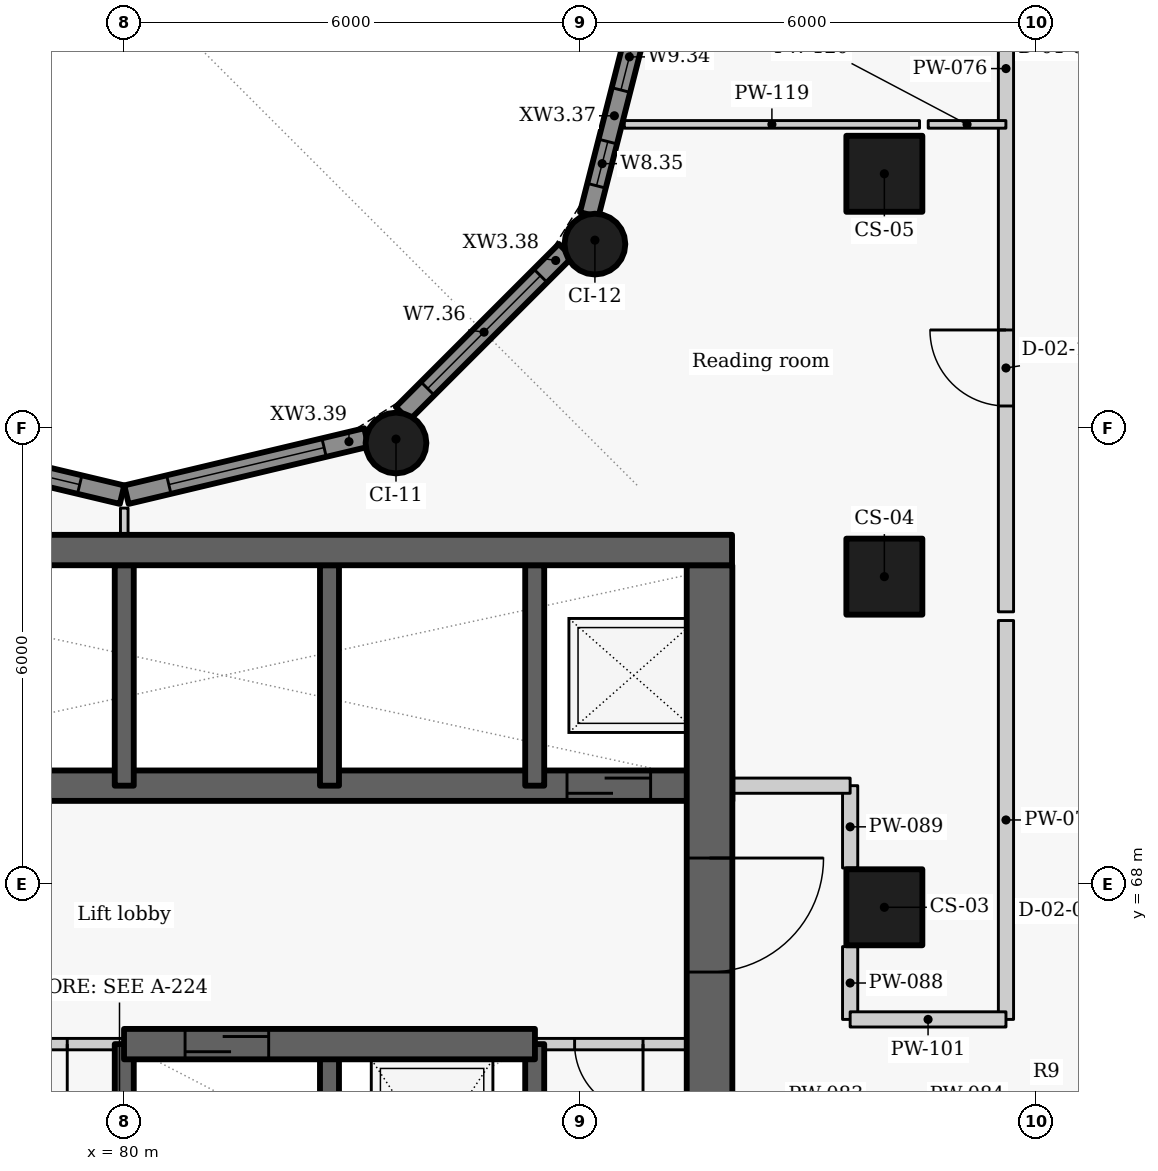
"""IFC4 building model, lengths in metres.
Left out: names, types, materials, properties, quantities, classifications, styles, units other than length and angle.
Written with IfcOpenShell. Run it as: python <this file> out.ifc"""

import sys

from ifc_helpers import new_model, si_unit, direction, frame, frame_2d, origin, origin_2d, place, context, subcontext, project, spatial, rectangle, circle, extrude, element, fill, save


model = new_model("IFC4")
c1 = context("Model", 3, precision=1e-05, world=origin(), true_north=direction((0.0, 1.0)))
c2 = subcontext(c1, "Body", "Model", "MODEL_VIEW")
j1 = project(units=[si_unit("LENGTHUNIT", "METRE"), si_unit("PLANEANGLEUNIT", "RADIAN")], contexts=[c1])
p1 = place(None, origin())
s1 = spatial("IfcSite", under=j1, at=p1, CompositionType="ELEMENT")
p2 = place(p1, origin())
s2 = spatial("IfcBuilding", under=s1, at=p2, CompositionType="ELEMENT")
p3 = place(p2, frame((0.0, 0.0, 127.2)))
s3 = spatial("IfcBuildingStorey", under=s2, at=p3, CompositionType="ELEMENT", Elevation=127.2)
for number, where, z_axis, x_axis in (
    (1, (90.0, 67.7, 0.0), (0.0, 0.0, 1.0), (0.0, 1.0, 0.0)),
    (2, (90.0, 72.05, 0.0), (0.0, 0.0, 1.0), (0.0, 1.0, 0.0)),
    (3, (90.0, 77.35, 0.0), (0.0, 0.0, 1.0), (0.0, 1.0, 0.0)),
):
    element("IfcColumn", number, at=place(p3, frame(where, z_axis=z_axis, x_axis=x_axis)), inside=s3, PredefinedType="COLUMN", context=c2, shape_type="SweptSolid", body=[
        extrude(rectangle(XDim=1.0, YDim=1.0, at=origin_2d()), origin(), (0.0, 0.0, 1.0), 3.3),
    ])
for number, where, z_axis, x_axis in (
    (4, (83.575, 73.808, 0.0), (0.0, 0.0, 1.0), (0.866, 0.5, 0.0)),
    (5, (86.192, 76.425, 0.0), (0.0, 0.0, 1.0), (0.5, 0.866, 0.0)),
):
    element("IfcColumn", number, at=place(p3, frame(where, z_axis=z_axis, x_axis=x_axis)), inside=s3, PredefinedType="COLUMN", context=c2, shape_type="SweptSolid", body=[
        extrude(circle(Radius=0.4, at=origin_2d()), origin(), (0.0, 0.0, 1.0), 3.3),
    ])
p4 = place(p3, frame((86.86, 79.73, 0.0), z_axis=(0.0, 0.0, 1.0), x_axis=(-0.247055971283, -0.969001211069, 0.0)))
e6 = element("IfcWall", 6, at=p4, inside=s3, PredefinedType="SOLIDWALL", context=c2, shape_type="SweptSolid", body=[
    extrude(rectangle(XDim=3.01, YDim=0.25, at=frame_2d((1.505, 0.0))), origin(), (0.0, 0.0, 1.0), 2.425),
])
p5 = place(p4, frame((0.419, 0.0, 0.9)))
e7 = element("IfcOpeningElement", 7, at=p5, cuts=e6, PredefinedType="OPENING", context=c2, shape_type="SweptSolid", body=[
    extrude(rectangle(XDim=0.9, YDim=1.1, at=frame_2d((0.45, 0.55))), frame((0.0, 0.135, 0.0), z_axis=(0.0, -1.0, 0.0), x_axis=(1.0, 0.0, 0.0)), (0.0, 0.0, 1.0), 0.27),
])
p6 = place(p4, frame((2.018, 0.0, 0.9)))
e8 = element("IfcOpeningElement", 8, at=p6, cuts=e6, PredefinedType="OPENING", context=c2, shape_type="SweptSolid", body=[
    extrude(rectangle(XDim=0.6, YDim=1.1, at=frame_2d((0.3, 0.55))), frame((0.0, 0.135, 0.0), z_axis=(0.0, -1.0, 0.0), x_axis=(1.0, 0.0, 0.0)), (0.0, 0.0, 1.0), 0.27),
])
p7 = place(p3, frame((85.806, 76.339, 0.0), z_axis=(0.0, 0.0, 1.0), x_axis=(-0.707106781187, -0.707106781187, 0.0)))
e9 = element("IfcWall", 9, at=p7, inside=s3, PredefinedType="SOLIDWALL", context=c2, shape_type="SweptSolid", body=[
    extrude(rectangle(XDim=3.033, YDim=0.25, at=frame_2d((1.517, 0.0))), origin(), (0.0, 0.0, 1.0), 2.425),
])
p8 = place(p7, frame((0.467, 0.0, 0.9)))
e10 = element("IfcOpeningElement", 10, at=p8, cuts=e9, PredefinedType="OPENING", context=c2, shape_type="SweptSolid", body=[
    extrude(rectangle(XDim=2.1, YDim=1.1, at=frame_2d((1.05, 0.55))), frame((0.0, 0.135, 0.0), z_axis=(0.0, -1.0, 0.0), x_axis=(1.0, 0.0, 0.0)), (0.0, 0.0, 1.0), 0.27),
])
p9 = place(p3, frame((83.186, 73.881, 0.0), z_axis=(0.0, 0.0, 1.0), x_axis=(-0.972773113459, -0.231759508395, 0.0)))
e11 = element("IfcWall", 11, at=p9, inside=s3, PredefinedType="SOLIDWALL", context=c2, shape_type="SweptSolid", body=[
    extrude(rectangle(XDim=3.246, YDim=0.25, at=frame_2d((1.623, 0.0))), origin(), (0.0, 0.0, 1.0), 2.425),
])
p10 = place(p9, frame((0.573, 0.0, 0.9)))
e12 = element("IfcOpeningElement", 12, at=p10, cuts=e11, PredefinedType="OPENING", context=c2, shape_type="SweptSolid", body=[
    extrude(rectangle(XDim=2.1, YDim=1.1, at=frame_2d((1.05, 0.55))), frame((0.0, 0.135, 0.0), z_axis=(0.0, -1.0, 0.0), x_axis=(1.0, 0.0, 0.0)), (0.0, 0.0, 1.0), 0.27),
])
p11 = place(p3, frame((79.971, 73.128, 0.0), z_axis=(0.0, 0.0, 1.0), x_axis=(-0.972773113459, 0.231759508395, 0.0)))
e13 = element("IfcWall", 13, at=p11, inside=s3, PredefinedType="SOLIDWALL", context=c2, shape_type="SweptSolid", body=[
    extrude(rectangle(XDim=3.246, YDim=0.25, at=frame_2d((1.623, 0.0))), origin(), (0.0, 0.0, 1.0), 2.425),
])
p12 = place(p11, frame((0.573, 0.0, 0.9)))
e14 = element("IfcOpeningElement", 14, at=p12, cuts=e13, PredefinedType="OPENING", context=c2, shape_type="SweptSolid", body=[
    extrude(rectangle(XDim=2.1, YDim=1.1, at=frame_2d((1.05, 0.55))), frame((0.0, 0.135, 0.0), z_axis=(0.0, -1.0, 0.0), x_axis=(1.0, 0.0, 0.0)), (0.0, 0.0, 1.0), 0.27),
])
p13 = place(p3, frame((74.6, 69.3, -0.41), z_axis=(0.0, 0.0, 1.0), x_axis=(1.0, 0.0, 0.0)))
e15 = element("IfcWall", 15, at=p13, inside=s3, PredefinedType="SHEAR", context=c2, shape_type="SweptSolid", body=[
    extrude(rectangle(XDim=13.4, YDim=0.4, at=frame_2d((6.7, 0.0))), origin(), (0.0, 0.0, 1.0), 3.435),
])
p14 = place(p13, frame((11.225, 0.0, 0.41)))
e16 = element("IfcOpeningElement", 16, at=p14, cuts=e15, PredefinedType="OPENING", context=c2, shape_type="SweptSolid", body=[
    extrude(rectangle(XDim=1.1, YDim=2.1, at=frame_2d((0.55, 1.05))), frame((0.0, 0.21, 0.0), z_axis=(0.0, -1.0, 0.0), x_axis=(1.0, 0.0, 0.0)), (0.0, 0.0, 1.0), 0.42),
])
p15 = place(p3, frame((80.0, 63.1, -0.41), z_axis=(0.0, 0.0, 1.0), x_axis=(0.0, 1.0, 0.0)))
e17 = element("IfcWall", 17, at=p15, inside=s3, PredefinedType="SHEAR", context=c2, shape_type="SweptSolid", body=[
    extrude(rectangle(XDim=2.8, YDim=0.25, at=frame_2d((1.4, 0.0))), origin(), (0.0, 0.0, 1.0), 3.435),
])
p16 = place(p3, frame((80.0, 69.3, -0.41), z_axis=(0.0, 0.0, 1.0), x_axis=(0.0, 1.0, 0.0)))
e18 = element("IfcWall", 18, at=p16, inside=s3, PredefinedType="SHEAR", context=c2, shape_type="SweptSolid", body=[
    extrude(rectangle(XDim=2.9, YDim=0.25, at=frame_2d((1.45, 0.0))), origin(), (0.0, 0.0, 1.0), 3.435),
])
p17 = place(p3, frame((82.7, 63.1, -0.41), z_axis=(0.0, 0.0, 1.0), x_axis=(0.0, 1.0, 0.0)))
e19 = element("IfcWall", 19, at=p17, inside=s3, PredefinedType="SHEAR", context=c2, shape_type="SweptSolid", body=[
    extrude(rectangle(XDim=2.8, YDim=0.25, at=frame_2d((1.4, 0.0))), origin(), (0.0, 0.0, 1.0), 3.435),
])
p18 = place(p3, frame((82.7, 69.3, -0.41), z_axis=(0.0, 0.0, 1.0), x_axis=(0.0, 1.0, 0.0)))
e20 = element("IfcWall", 20, at=p18, inside=s3, PredefinedType="SHEAR", context=c2, shape_type="SweptSolid", body=[
    extrude(rectangle(XDim=2.9, YDim=0.25, at=frame_2d((1.45, 0.0))), origin(), (0.0, 0.0, 1.0), 3.435),
])
p19 = place(p3, frame((85.4, 63.1, -0.41), z_axis=(0.0, 0.0, 1.0), x_axis=(0.0, 1.0, 0.0)))
e21 = element("IfcWall", 21, at=p19, inside=s3, PredefinedType="SHEAR", context=c2, shape_type="SweptSolid", body=[
    extrude(rectangle(XDim=2.8, YDim=0.25, at=frame_2d((1.4, 0.0))), origin(), (0.0, 0.0, 1.0), 3.435),
])
p20 = place(p3, frame((85.4, 69.3, -0.41), z_axis=(0.0, 0.0, 1.0), x_axis=(0.0, 1.0, 0.0)))
e22 = element("IfcWall", 22, at=p20, inside=s3, PredefinedType="SHEAR", context=c2, shape_type="SweptSolid", body=[
    extrude(rectangle(XDim=2.9, YDim=0.25, at=frame_2d((1.45, 0.0))), origin(), (0.0, 0.0, 1.0), 3.435),
])
p21 = place(p3, frame((87.7, 72.2, -0.41), z_axis=(0.0, 0.0, 1.0), x_axis=(0.0, -1.0, 0.0)))
e23 = element("IfcWall", 23, at=p21, inside=s3, PredefinedType="SHEAR", context=c2, shape_type="SweptSolid", body=[
    extrude(rectangle(XDim=15.6, YDim=0.6, at=frame_2d((7.8, 0.0))), origin(), (0.0, 0.0, 1.0), 3.435),
])
p22 = place(p21, frame((3.852, 0.0, 0.41)))
e24 = element("IfcOpeningElement", 24, at=p22, cuts=e23, PredefinedType="OPENING", context=c2, shape_type="SweptSolid", body=[
    extrude(rectangle(XDim=1.5, YDim=2.1, at=frame_2d((0.75, 1.05))), frame((0.0, 0.31, 0.0), z_axis=(0.0, -1.0, 0.0), x_axis=(1.0, 0.0, 0.0)), (0.0, 0.0, 1.0), 0.62),
])
p23 = place(p3, frame((80.003, 65.9, 0.0), z_axis=(0.0, 0.0, 1.0), x_axis=(-1.0, 0.0, 0.0)))
e25 = element("IfcWall", 25, at=p23, inside=s3, PredefinedType="PARTITIONING", context=c2, shape_type="SweptSolid", body=[
    extrude(rectangle(XDim=2.706, YDim=0.15, at=frame_2d((1.353, 0.0))), origin(), (0.0, 0.0, 1.0), 3.025),
])
p24 = place(p23, frame((0.753, 0.0, 0.0)))
e26 = element("IfcOpeningElement", 26, at=p24, cuts=e25, PredefinedType="OPENING", context=c2, shape_type="SweptSolid", body=[
    extrude(rectangle(XDim=1.2, YDim=2.1, at=frame_2d((0.6, 1.05))), frame((0.0, 0.085, 0.0), z_axis=(0.0, -1.0, 0.0), x_axis=(1.0, 0.0, 0.0)), (0.0, 0.0, 1.0), 0.17),
])
p25 = place(p3, frame((88.0, 65.9, 0.0), z_axis=(0.0, 0.0, 1.0), x_axis=(-1.0, 0.0, 0.0)))
e27 = element("IfcWall", 27, at=p25, inside=s3, PredefinedType="PARTITIONING", context=c2, shape_type="SweptSolid", body=[
    extrude(rectangle(XDim=2.603, YDim=0.15, at=frame_2d((1.302, 0.0))), origin(), (0.0, 0.0, 1.0), 3.025),
])
p26 = place(p25, frame((1.175, 0.0, 0.0)))
e28 = element("IfcOpeningElement", 28, at=p26, cuts=e27, PredefinedType="OPENING", context=c2, shape_type="SweptSolid", body=[
    extrude(rectangle(XDim=0.9, YDim=2.1, at=frame_2d((0.45, 1.05))), frame((0.0, 0.085, 0.0), z_axis=(0.0, -1.0, 0.0), x_axis=(1.0, 0.0, 0.0)), (0.0, 0.0, 1.0), 0.17),
])
p27 = place(p3, frame((79.997, 65.9, -0.41), z_axis=(0.0, 0.0, 1.0), x_axis=(1.0, 0.0, 0.0)))
e29 = element("IfcWall", 29, at=p27, inside=s3, PredefinedType="SHEAR", context=c2, shape_type="SweptSolid", body=[
    extrude(rectangle(XDim=5.406, YDim=0.4, at=frame_2d((2.703, 0.0))), origin(), (0.0, 0.0, 1.0), 3.435),
])
p28 = place(p27, frame((0.803, 0.0, 0.41)))
e30 = element("IfcOpeningElement", 30, at=p28, cuts=e29, PredefinedType="OPENING", context=c2, shape_type="SweptSolid", body=[
    extrude(rectangle(XDim=1.1, YDim=2.1, at=frame_2d((0.55, 1.05))), frame((0.0, 0.21, 0.0), z_axis=(0.0, -1.0, 0.0), x_axis=(1.0, 0.0, 0.0)), (0.0, 0.0, 1.0), 0.42),
])
p29 = place(p3, frame((91.6, 66.225, 0.0), z_axis=(0.0, 0.0, 1.0), x_axis=(0.0, 1.0, 0.0)))
e31 = element("IfcWall", 31, at=p29, inside=s3, PredefinedType="PARTITIONING", context=c2, shape_type="SweptSolid", body=[
    extrude(rectangle(XDim=5.248, YDim=0.2, at=frame_2d((2.624, 0.0))), origin(), (0.0, 0.0, 1.0), 3.025),
])
p30 = place(p3, frame((91.6, 71.587, 0.0), z_axis=(0.0, 0.0, 1.0), x_axis=(0.0, 1.0, 0.0)))
e32 = element("IfcWall", 32, at=p30, inside=s3, PredefinedType="PARTITIONING", context=c2, shape_type="SweptSolid", body=[
    extrude(rectangle(XDim=10.486, YDim=0.2, at=frame_2d((5.243, 0.0))), origin(), (0.0, 0.0, 1.0), 3.025),
])
p31 = place(p30, frame((2.708, 0.0, 0.0)))
e33 = element("IfcOpeningElement", 33, at=p31, cuts=e32, PredefinedType="OPENING", context=c2, shape_type="SweptSolid", body=[
    extrude(rectangle(XDim=1.0, YDim=2.1, at=frame_2d((0.5, 1.05))), frame((0.0, 0.11, 0.0), z_axis=(0.0, -1.0, 0.0), x_axis=(1.0, 0.0, 0.0)), (0.0, 0.0, 1.0), 0.22),
])
p32 = place(p3, frame((89.55, 66.225, 0.0), z_axis=(0.0, 0.0, 1.0), x_axis=(0.0, 1.0, 0.0)))
e34 = element("IfcWall", 34, at=p32, inside=s3, PredefinedType="PARTITIONING", context=c2, shape_type="SweptSolid", body=[
    extrude(rectangle(XDim=0.958, YDim=0.2, at=frame_2d((0.479, 0.0))), origin(), (0.0, 0.0, 1.0), 3.025),
])
p33 = place(p3, frame((89.55, 68.217, 0.0), z_axis=(0.0, 0.0, 1.0), x_axis=(0.0, 1.0, 0.0)))
e35 = element("IfcWall", 35, at=p33, inside=s3, PredefinedType="PARTITIONING", context=c2, shape_type="SweptSolid", body=[
    extrude(rectangle(XDim=1.083, YDim=0.2, at=frame_2d((0.542, 0.0))), origin(), (0.0, 0.0, 1.0), 3.025),
])
p34 = place(p3, frame((88.0, 69.3, 0.0), z_axis=(0.0, 0.0, 1.0), x_axis=(1.0, 0.0, 0.0)))
e36 = element("IfcWall", 36, at=p34, inside=s3, PredefinedType="PARTITIONING", context=c2, shape_type="SweptSolid", body=[
    extrude(rectangle(XDim=1.55, YDim=0.2, at=frame_2d((0.775, 0.0))), origin(), (0.0, 0.0, 1.0), 3.025),
])
p35 = place(p3, frame((89.55, 66.225, 0.0), z_axis=(0.0, 0.0, 1.0), x_axis=(1.0, 0.0, 0.0)))
e37 = element("IfcWall", 37, at=p35, inside=s3, PredefinedType="PARTITIONING", context=c2, shape_type="SweptSolid", body=[
    extrude(rectangle(XDim=2.05, YDim=0.2, at=frame_2d((1.025, 0.0))), origin(), (0.0, 0.0, 1.0), 2.505),
])
p36 = place(p3, frame((80.0, 72.6, 0.0), z_axis=(0.0, 0.0, 1.0), x_axis=(0.0, 1.0, 0.0)))
e38 = element("IfcWall", 38, at=p36, inside=s3, PredefinedType="PARTITIONING", context=c2, shape_type="SweptSolid", body=[
    extrude(rectangle(XDim=0.352, YDim=0.1, at=frame_2d((0.176, 0.0))), origin(), (0.0, 0.0, 1.0), 3.025),
])
p37 = place(p3, frame((86.578, 78.0, 0.0), z_axis=(0.0, 0.0, 1.0), x_axis=(1.0, 0.0, 0.0)))
e39 = element("IfcWall", 39, at=p37, inside=s3, PredefinedType="PARTITIONING", context=c2, shape_type="SweptSolid", body=[
    extrude(rectangle(XDim=3.885, YDim=0.1, at=frame_2d((1.942, 0.0))), origin(), (0.0, 0.0, 1.0), 2.505),
])
p38 = place(p3, frame((90.577, 78.0, 0.0), z_axis=(0.0, 0.0, 1.0), x_axis=(1.0, 0.0, 0.0)))
e40 = element("IfcWall", 40, at=p38, inside=s3, PredefinedType="PARTITIONING", context=c2, shape_type="SweptSolid", body=[
    extrude(rectangle(XDim=1.022, YDim=0.1, at=frame_2d((0.511, 0.0))), origin(), (0.0, 0.0, 1.0), 3.025),
])
p39 = place(p3, frame((72.004, 72.4, -0.41), z_axis=(0.0, 0.0, 1.0), x_axis=(1.0, 0.0, 0.0)))
e41 = element("IfcWall", 41, at=p39, inside=s3, PredefinedType="SHEAR", context=c2, shape_type="SweptSolid", body=[
    extrude(rectangle(XDim=15.992, YDim=0.4, at=frame_2d((7.996, 0.0))), origin(), (0.0, 0.0, 1.0), 3.435),
])
p40 = place(p5, origin())
e42 = element("IfcWindow", 42, at=p40, inside=s3, PartitioningType="SINGLE_PANEL", PredefinedType="WINDOW", context=c2, shape_type="SweptSolid", body=[
    extrude(rectangle(XDim=0.9, YDim=1.1, at=frame_2d((0.45, 0.55))), frame((0.0, 0.03, 0.0), z_axis=(0.0, -1.0, 0.0), x_axis=(1.0, 0.0, 0.0)), (0.0, 0.0, 1.0), 0.06),
])
fill(e7, e42)
p41 = place(p6, origin())
e43 = element("IfcWindow", 43, at=p41, inside=s3, PartitioningType="SINGLE_PANEL", PredefinedType="WINDOW", context=c2, shape_type="SweptSolid", body=[
    extrude(rectangle(XDim=0.6, YDim=1.1, at=frame_2d((0.3, 0.55))), frame((0.0, 0.03, 0.0), z_axis=(0.0, -1.0, 0.0), x_axis=(1.0, 0.0, 0.0)), (0.0, 0.0, 1.0), 0.06),
])
fill(e8, e43)
p42 = place(p8, origin())
e44 = element("IfcWindow", 44, at=p42, inside=s3, PartitioningType="SINGLE_PANEL", PredefinedType="WINDOW", context=c2, shape_type="SweptSolid", body=[
    extrude(rectangle(XDim=2.1, YDim=1.1, at=frame_2d((1.05, 0.55))), frame((0.0, 0.03, 0.0), z_axis=(0.0, -1.0, 0.0), x_axis=(1.0, 0.0, 0.0)), (0.0, 0.0, 1.0), 0.06),
])
fill(e10, e44)
p43 = place(p10, origin())
e45 = element("IfcWindow", 45, at=p43, inside=s3, PartitioningType="SINGLE_PANEL", PredefinedType="WINDOW", context=c2, shape_type="SweptSolid", body=[
    extrude(rectangle(XDim=2.1, YDim=1.1, at=frame_2d((1.05, 0.55))), frame((0.0, 0.03, 0.0), z_axis=(0.0, -1.0, 0.0), x_axis=(1.0, 0.0, 0.0)), (0.0, 0.0, 1.0), 0.06),
])
fill(e12, e45)
p44 = place(p12, origin())
e46 = element("IfcWindow", 46, at=p44, inside=s3, PartitioningType="SINGLE_PANEL", PredefinedType="WINDOW", context=c2, shape_type="SweptSolid", body=[
    extrude(rectangle(XDim=2.1, YDim=1.1, at=frame_2d((1.05, 0.55))), frame((0.0, 0.03, 0.0), z_axis=(0.0, -1.0, 0.0), x_axis=(1.0, 0.0, 0.0)), (0.0, 0.0, 1.0), 0.06),
])
fill(e14, e46)
p45 = place(p14, origin())
e47 = element("IfcDoor", 47, at=p45, inside=s3, OperationType="SLIDING_TO_LEFT", PredefinedType="DOOR", context=c2, shape_type="SweptSolid", body=[
    extrude(rectangle(XDim=1.1, YDim=2.1, at=frame_2d((0.55, 1.05))), frame((0.0, 0.025, 0.0), z_axis=(0.0, -1.0, 0.0), x_axis=(1.0, 0.0, 0.0)), (0.0, 0.0, 1.0), 0.05),
])
fill(e16, e47)
p46 = place(p24, origin())
e48 = element("IfcDoor", 48, at=p46, inside=s3, OperationType="DOUBLE_DOOR_SINGLE_SWING", PredefinedType="DOOR", context=c2, shape_type="SweptSolid", body=[
    extrude(rectangle(XDim=1.2, YDim=2.1, at=frame_2d((0.6, 1.05))), frame((0.0, 0.025, 0.0), z_axis=(0.0, -1.0, 0.0), x_axis=(1.0, 0.0, 0.0)), (0.0, 0.0, 1.0), 0.05),
])
fill(e26, e48)
p47 = place(p28, origin())
e49 = element("IfcDoor", 49, at=p47, inside=s3, OperationType="SLIDING_TO_LEFT", PredefinedType="DOOR", context=c2, shape_type="SweptSolid", body=[
    extrude(rectangle(XDim=1.1, YDim=2.1, at=frame_2d((0.55, 1.05))), frame((0.0, 0.025, 0.0), z_axis=(0.0, -1.0, 0.0), x_axis=(1.0, 0.0, 0.0)), (0.0, 0.0, 1.0), 0.05),
])
fill(e30, e49)
p48 = place(p26, origin())
e50 = element("IfcDoor", 50, at=p48, inside=s3, OperationType="SINGLE_SWING_LEFT", PredefinedType="DOOR", context=c2, shape_type="SweptSolid", body=[
    extrude(rectangle(XDim=0.9, YDim=2.1, at=frame_2d((0.45, 1.05))), frame((0.0, 0.025, 0.0), z_axis=(0.0, -1.0, 0.0), x_axis=(1.0, 0.0, 0.0)), (0.0, 0.0, 1.0), 0.05),
])
fill(e28, e50)
p49 = place(p31, origin())
e51 = element("IfcDoor", 51, at=p49, inside=s3, OperationType="SINGLE_SWING_RIGHT", PredefinedType="DOOR", context=c2, shape_type="SweptSolid", body=[
    extrude(rectangle(XDim=1.0, YDim=2.1, at=frame_2d((0.5, 1.05))), frame((0.0, 0.025, 0.0), z_axis=(0.0, -1.0, 0.0), x_axis=(1.0, 0.0, 0.0)), (0.0, 0.0, 1.0), 0.05),
])
fill(e33, e51)
p50 = place(p22, origin())
e52 = element("IfcDoor", 52, at=p50, inside=s3, OperationType="DOUBLE_DOOR_SINGLE_SWING", PredefinedType="DOOR", context=c2, shape_type="SweptSolid", body=[
    extrude(rectangle(XDim=1.5, YDim=2.1, at=frame_2d((0.75, 1.05))), frame((0.0, 0.025, 0.0), z_axis=(0.0, -1.0, 0.0), x_axis=(1.0, 0.0, 0.0)), (0.0, 0.0, 1.0), 0.05),
])
fill(e24, e52)
save(model, sys.argv[1])
